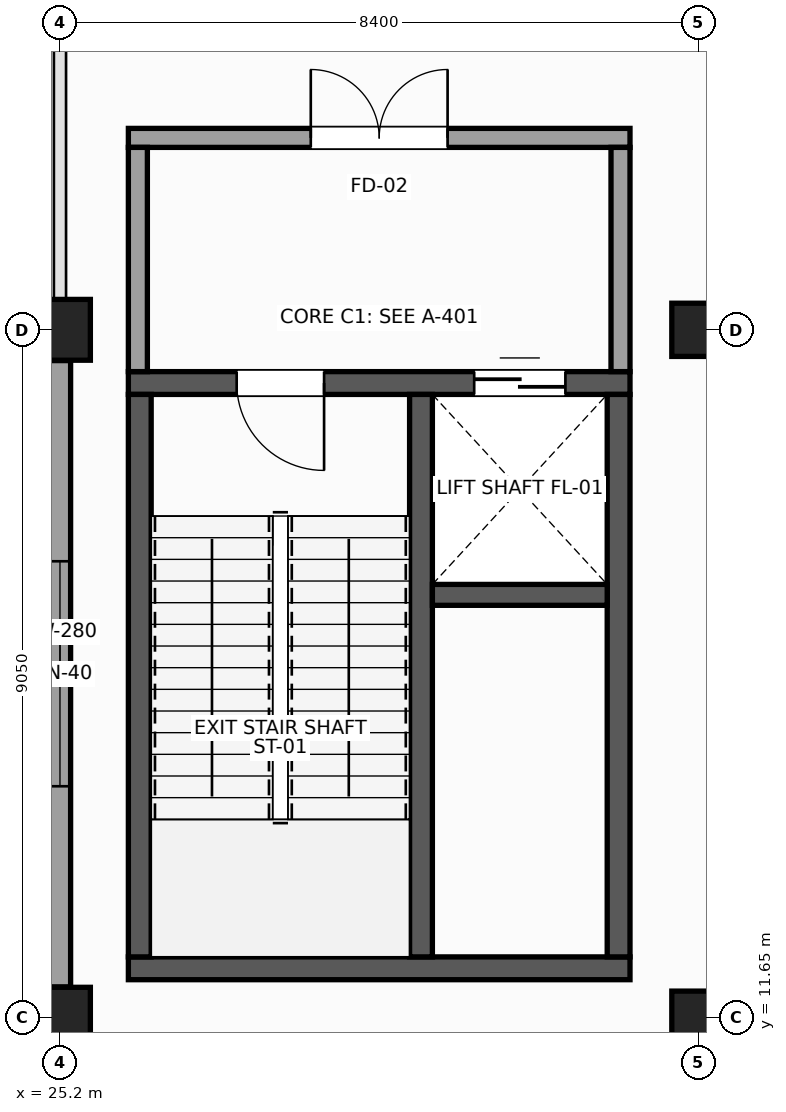
"""IFC4 building model, lengths in metres.
Left out: names, types, materials, properties, quantities, classifications, styles, units other than length and angle.
Written with IfcOpenShell. Run it as: python <this file> out.ifc"""

import sys

from ifc_helpers import new_model, si_unit, direction, frame, frame_2d, origin, origin_2d, place, context, subcontext, project, spatial, rectangle, extrude, element, fill, save


model = new_model("IFC4")
c1 = context("Model", 3, precision=1e-05, world=origin(), true_north=direction((0.0, 1.0)))
c2 = subcontext(c1, "Body", "Model", "MODEL_VIEW")
j1 = project(units=[si_unit("LENGTHUNIT", "METRE"), si_unit("PLANEANGLEUNIT", "RADIAN")], contexts=[c1])
p1 = place(None, origin())
s1 = spatial("IfcSite", under=j1, at=p1, CompositionType="ELEMENT")
p2 = place(p1, origin())
s2 = spatial("IfcBuilding", under=s1, at=p2, CompositionType="ELEMENT")
p3 = place(p2, frame((0.0, 0.0, 5.4)))
s3 = spatial("IfcBuildingStorey", under=s2, at=p3, CompositionType="ELEMENT", Elevation=5.4)
for number, where, z_axis, x_axis in (
    (1, (25.2, 11.65, 0.0), (0.0, 0.0, 1.0), (1.0, 0.0, 0.0)),
    (2, (25.2, 20.7, 0.0), (0.0, 0.0, 1.0), (1.0, 0.0, 0.0)),
):
    element("IfcColumn", number, at=place(p3, frame(where, z_axis=z_axis, x_axis=x_axis)), inside=s3, PredefinedType="COLUMN", context=c2, shape_type="SweptSolid", body=[
        extrude(rectangle(XDim=0.8, YDim=0.8, at=origin_2d()), origin(), (0.0, 0.0, 1.0), 5.4),
    ])
for number, where, z_axis, x_axis in (
    (3, (33.6, 11.65, 0.0), (0.0, 0.0, 1.0), (1.0, 0.0, 0.0)),
    (4, (33.6, 20.7, 0.0), (0.0, 0.0, 1.0), (1.0, 0.0, 0.0)),
):
    element("IfcColumn", number, at=place(p3, frame(where, z_axis=z_axis, x_axis=x_axis)), inside=s3, PredefinedType="COLUMN", context=c2, shape_type="SweptSolid", body=[
        extrude(rectangle(XDim=0.7, YDim=0.7, at=origin_2d()), origin(), (0.0, 0.0, 1.0), 5.4),
    ])
p4 = place(p3, frame((25.2, 20.295, 0.0), z_axis=(0.0, 0.0, 1.0), x_axis=(0.0, -1.0, 0.0)))
e5 = element("IfcWall", 5, at=p4, inside=s3, PredefinedType="STANDARD", context=c2, shape_type="SweptSolid", body=[
    extrude(rectangle(XDim=8.24, YDim=0.28, at=frame_2d((4.12, 0.0))), origin(), (0.0, 0.0, 1.0), 4.25),
])
p5 = place(p4, frame((2.64, 0.0, 0.95)))
e6 = element("IfcOpeningElement", 6, at=p5, cuts=e5, PredefinedType="OPENING", context=c2, shape_type="SweptSolid", body=[
    extrude(rectangle(XDim=2.96, YDim=2.16, at=frame_2d((1.48, 1.08))), frame((0.0, 0.15, 0.0), z_axis=(0.0, -1.0, 0.0), x_axis=(1.0, 0.0, 0.0)), (0.0, 0.0, 1.0), 0.3),
])
p6 = place(p3, frame((26.1, 12.3, 0.0), z_axis=(0.0, 0.0, 1.0), x_axis=(1.0, 0.0, 0.0)))
e7 = element("IfcWall", 7, at=p6, inside=s3, PredefinedType="SHEAR", context=c2, shape_type="SweptSolid", body=[
    extrude(rectangle(XDim=6.6, YDim=0.3, at=frame_2d((3.3, 0.0))), origin(), (0.0, 0.0, 1.0), 5.1),
])
p7 = place(p3, frame((26.1, 20.0, 0.0), z_axis=(0.0, 0.0, 1.0), x_axis=(1.0, 0.0, 0.0)))
e8 = element("IfcWall", 8, at=p7, inside=s3, PredefinedType="SHEAR", context=c2, shape_type="SweptSolid", body=[
    extrude(rectangle(XDim=6.6, YDim=0.3, at=frame_2d((3.3, 0.0))), origin(), (0.0, 0.0, 1.0), 5.1),
])
p8 = place(p7, frame((1.425, 0.0, 0.0)))
e9 = element("IfcOpeningElement", 9, at=p8, cuts=e8, PredefinedType="OPENING", context=c2, shape_type="SweptSolid", body=[
    extrude(rectangle(XDim=1.15, YDim=2.2, at=frame_2d((0.575, 1.1))), frame((0.0, 0.16, 0.0), z_axis=(0.0, -1.0, 0.0), x_axis=(1.0, 0.0, 0.0)), (0.0, 0.0, 1.0), 0.32),
])
p9 = place(p7, frame((4.55, 0.0, 0.0)))
e10 = element("IfcOpeningElement", 10, at=p9, cuts=e8, PredefinedType="OPENING", context=c2, shape_type="SweptSolid", body=[
    extrude(rectangle(XDim=1.2, YDim=2.15, at=frame_2d((0.6, 1.075))), frame((0.0, 0.16, 0.0), z_axis=(0.0, -1.0, 0.0), x_axis=(1.0, 0.0, 0.0)), (0.0, 0.0, 1.0), 0.32),
])
for number, where, z_axis, x_axis in (
    (11, (26.25, 12.45, 0.0), (0.0, 0.0, 1.0), (0.0, 1.0, 0.0)),
    (12, (32.55, 12.45, 0.0), (0.0, 0.0, 1.0), (0.0, 1.0, 0.0)),
    (13, (29.95, 12.45, 0.0), (0.0, 0.0, 1.0), (0.0, 1.0, 0.0)),
):
    element("IfcWall", number, at=place(p3, frame(where, z_axis=z_axis, x_axis=x_axis)), inside=s3, PredefinedType="SHEAR", context=c2, shape_type="SweptSolid", body=[
        extrude(rectangle(XDim=7.4, YDim=0.3, at=frame_2d((3.7, 0.0))), origin(), (0.0, 0.0, 1.0), 5.1),
    ])
p10 = place(p3, frame((30.1, 17.213, 0.0), z_axis=(0.0, 0.0, 1.0), x_axis=(1.0, 0.0, 0.0)))
e14 = element("IfcWall", 14, at=p10, inside=s3, PredefinedType="SHEAR", context=c2, shape_type="SweptSolid", body=[
    extrude(rectangle(XDim=2.3, YDim=0.275, at=frame_2d((1.15, 0.0))), origin(), (0.0, 0.0, 1.0), 5.1),
])
p11 = place(p3, frame((26.1, 23.225, 0.0), z_axis=(0.0, 0.0, 1.0), x_axis=(1.0, 0.0, 0.0)))
e15 = element("IfcWall", 15, at=p11, inside=s3, PredefinedType="PARTITIONING", context=c2, shape_type="SweptSolid", body=[
    extrude(rectangle(XDim=6.6, YDim=0.25, at=frame_2d((3.3, 0.0))), origin(), (0.0, 0.0, 1.0), 5.1),
])
p12 = place(p11, frame((2.4, 0.0, 0.0)))
e16 = element("IfcOpeningElement", 16, at=p12, cuts=e15, PredefinedType="OPENING", context=c2, shape_type="SweptSolid", body=[
    extrude(rectangle(XDim=1.8, YDim=2.25, at=frame_2d((0.9, 1.125))), frame((0.0, 0.135, 0.0), z_axis=(0.0, -1.0, 0.0), x_axis=(1.0, 0.0, 0.0)), (0.0, 0.0, 1.0), 0.27),
])
for number, where, z_axis, x_axis in (
    (17, (26.225, 20.15, 0.0), (0.0, 0.0, 1.0), (0.0, 1.0, 0.0)),
    (18, (32.575, 20.15, 0.0), (0.0, 0.0, 1.0), (0.0, 1.0, 0.0)),
):
    element("IfcWall", number, at=place(p3, frame(where, z_axis=z_axis, x_axis=x_axis)), inside=s3, PredefinedType="PARTITIONING", context=c2, shape_type="SweptSolid", body=[
        extrude(rectangle(XDim=2.95, YDim=0.25, at=frame_2d((1.475, 0.0))), origin(), (0.0, 0.0, 1.0), 4.33),
    ])
p13 = place(p5, origin())
e19 = element("IfcWindow", 19, at=p13, inside=s3, PartitioningType="SINGLE_PANEL", PredefinedType="WINDOW", context=c2, shape_type="SweptSolid", body=[
    extrude(rectangle(XDim=2.96, YDim=2.16, at=frame_2d((1.48, 1.08))), frame((0.0, 0.03, 0.0), z_axis=(0.0, -1.0, 0.0), x_axis=(1.0, 0.0, 0.0)), (0.0, 0.0, 1.0), 0.06),
])
fill(e6, e19)
p14 = place(p8, frame((1.15, 0.0, 0.0), z_axis=(0.0, 0.0, 1.0), x_axis=(-1.0, 0.0, 0.0)))
e20 = element("IfcDoor", 20, at=p14, inside=s3, OperationType="SINGLE_SWING_LEFT", PredefinedType="DOOR", context=c2, shape_type="SweptSolid", body=[
    extrude(rectangle(XDim=1.15, YDim=2.2, at=frame_2d((0.575, 1.1))), frame((0.0, 0.025, 0.0), z_axis=(0.0, -1.0, 0.0), x_axis=(1.0, 0.0, 0.0)), (0.0, 0.0, 1.0), 0.05),
])
fill(e9, e20)
p15 = place(p9, origin())
e21 = element("IfcDoor", 21, at=p15, inside=s3, OperationType="DOUBLE_DOOR_SLIDING", PredefinedType="DOOR", context=c2, shape_type="SweptSolid", body=[
    extrude(rectangle(XDim=1.2, YDim=2.15, at=frame_2d((0.6, 1.075))), frame((0.0, 0.025, 0.0), z_axis=(0.0, -1.0, 0.0), x_axis=(1.0, 0.0, 0.0)), (0.0, 0.0, 1.0), 0.05),
])
fill(e10, e21)
p16 = place(p12, origin())
e22 = element("IfcDoor", 22, at=p16, inside=s3, OperationType="DOUBLE_DOOR_SINGLE_SWING", PredefinedType="DOOR", context=c2, shape_type="SweptSolid", body=[
    extrude(rectangle(XDim=1.8, YDim=2.25, at=frame_2d((0.9, 1.125))), frame((0.0, 0.025, 0.0), z_axis=(0.0, -1.0, 0.0), x_axis=(1.0, 0.0, 0.0)), (0.0, 0.0, 1.0), 0.05),
])
fill(e16, e22)
save(model, sys.argv[1])
